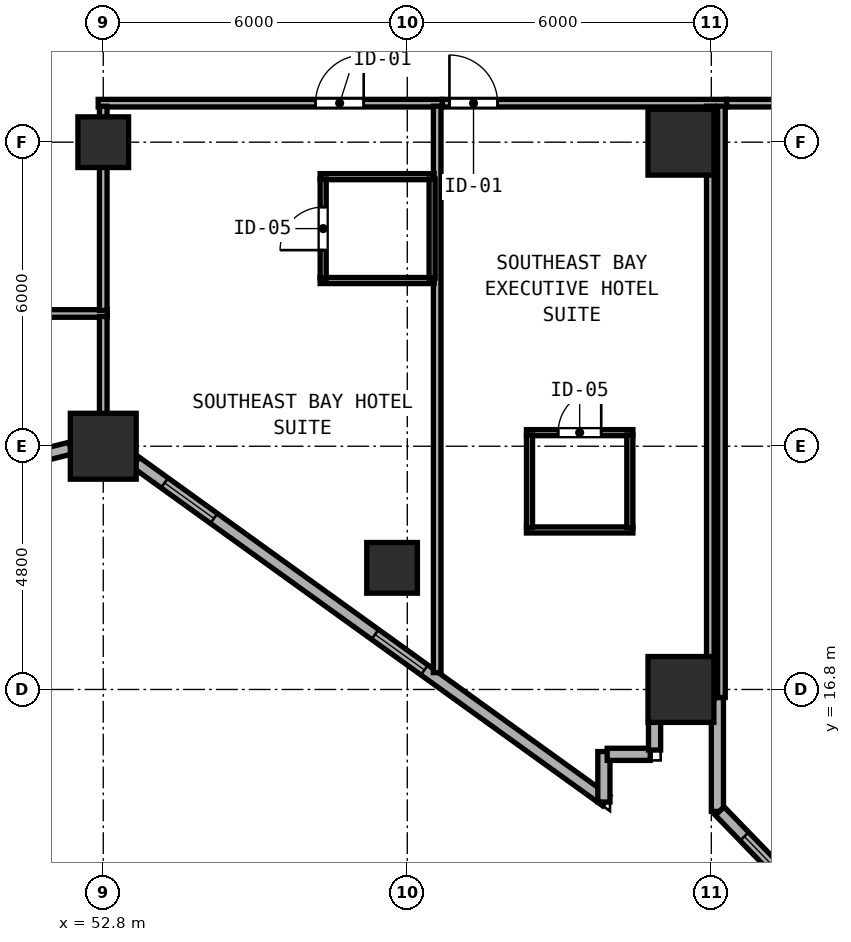
"""IFC4 building model, lengths in metres.
Left out: names, types, materials, properties, quantities, classifications, styles, units other than length and angle.
Written with IfcOpenShell. Run it as: python <this file> out.ifc"""

import sys

from ifc_helpers import new_model, si_unit, direction, frame, frame_2d, origin, origin_2d, place, context, subcontext, project, spatial, rectangle, hollow_rectangle, extrude, element, fill, save


model = new_model("IFC4")
c1 = context("Model", 3, precision=1e-05, world=origin(), true_north=direction((0.0, 1.0)))
c2 = subcontext(c1, "Body", "Model", "MODEL_VIEW")
j1 = project(units=[si_unit("LENGTHUNIT", "METRE"), si_unit("PLANEANGLEUNIT", "RADIAN")], contexts=[c1])
p1 = place(None, origin())
s1 = spatial("IfcSite", under=j1, at=p1, CompositionType="ELEMENT")
p2 = place(p1, origin())
s2 = spatial("IfcBuilding", under=s1, at=p2, CompositionType="ELEMENT")
p3 = place(p2, frame((0.0, 0.0, 35.4)))
s3 = spatial("IfcBuildingStorey", under=s2, at=p3, CompositionType="ELEMENT", Elevation=35.4)
for number, where, z_axis, x_axis in (
    (1, (52.8, 21.6, 0.0), (0.0, 0.0, 1.0), (1.0, 0.0, 0.0)),
    (2, (64.2, 16.8, 0.0), (0.0, 0.0, 1.0), (1.0, 0.0, 0.0)),
    (3, (64.2, 27.6, 0.0), (0.0, 0.0, 1.0), (1.0, 0.0, 0.0)),
):
    element("IfcColumn", number, at=place(p3, frame(where, z_axis=z_axis, x_axis=x_axis)), inside=s3, PredefinedType="COLUMN", context=c2, shape_type="SweptSolid", body=[
        extrude(hollow_rectangle(XDim=1.3, YDim=1.3, WallThickness=0.048, at=origin_2d()), origin(), (0.0, 0.0, 1.0), 3.8),
    ])
for number, where, z_axis, x_axis in (
    (4, (52.8, 27.6, 0.0), (0.0, 0.0, 1.0), (1.0, 0.0, 0.0)),
    (5, (58.5, 19.2, 0.0), (0.0, 0.0, 1.0), (1.0, 0.0, 0.0)),
):
    element("IfcColumn", number, at=place(p3, frame(where, z_axis=z_axis, x_axis=x_axis)), inside=s3, PredefinedType="COLUMN", context=c2, shape_type="SweptSolid", body=[
        extrude(hollow_rectangle(XDim=1.0, YDim=1.0, WallThickness=0.038, at=origin_2d()), origin(), (0.0, 0.0, 1.0), 3.8),
    ])
p4 = place(p3, frame((47.932, 20.507, 0.0), z_axis=(0.0, 0.0, 1.0), x_axis=(0.970135906278, 0.242561998982, 0.0)))
e6 = element("IfcWall", 6, at=p4, inside=s3, PredefinedType="SOLIDWALL", context=c2, shape_type="SweptSolid", body=[
    extrude(rectangle(XDim=4.356, YDim=0.24, at=frame_2d((2.178, 0.0))), origin(), (0.0, 0.0, 1.0), 3.097),
])
p5 = place(p4, frame((0.7, 0.0, 0.85)))
e7 = element("IfcOpeningElement", 7, at=p5, cuts=e6, PredefinedType="OPENING", context=c2, shape_type="SweptSolid", body=[
    extrude(rectangle(XDim=1.2, YDim=1.85, at=frame_2d((0.6, 0.925))), frame((0.0, 0.13, 0.0), z_axis=(0.0, -1.0, 0.0), x_axis=(1.0, 0.0, 0.0)), (0.0, 0.0, 1.0), 0.26),
])
p6 = place(p3, frame((53.442, 21.286, 0.0), z_axis=(0.0, 0.0, 1.0), x_axis=(0.811542842993, -0.584292917967, 0.0)))
e8 = element("IfcWall", 8, at=p6, inside=s3, PredefinedType="SOLIDWALL", context=c2, shape_type="SweptSolid", body=[
    extrude(rectangle(XDim=11.438, YDim=0.24, at=frame_2d((5.719, 0.0))), origin(), (0.0, 0.0, 1.0), 3.097),
])
p7 = place(p6, frame((0.7, 0.0, 0.85)))
e9 = element("IfcOpeningElement", 9, at=p7, cuts=e8, PredefinedType="OPENING", context=c2, shape_type="SweptSolid", body=[
    extrude(rectangle(XDim=1.2, YDim=1.85, at=frame_2d((0.6, 0.925))), frame((0.0, 0.13, 0.0), z_axis=(0.0, -1.0, 0.0), x_axis=(1.0, 0.0, 0.0)), (0.0, 0.0, 1.0), 0.26),
])
p8 = place(p6, frame((5.819, 0.0, 0.85)))
e10 = element("IfcOpeningElement", 10, at=p8, cuts=e8, PredefinedType="OPENING", context=c2, shape_type="SweptSolid", body=[
    extrude(rectangle(XDim=1.2, YDim=1.85, at=frame_2d((0.6, 0.925))), frame((0.0, 0.13, 0.0), z_axis=(0.0, -1.0, 0.0), x_axis=(1.0, 0.0, 0.0)), (0.0, 0.0, 1.0), 0.26),
])
p9 = place(p3, frame((62.68, 14.579, 0.0), z_axis=(0.0, 0.0, 1.0), x_axis=(0.0, 1.0, 0.0)))
e11 = element("IfcWall", 11, at=p9, inside=s3, PredefinedType="SOLIDWALL", context=c2, shape_type="SweptSolid", body=[
    extrude(rectangle(XDim=0.996, YDim=0.24, at=frame_2d((0.498, 0.0))), origin(), (0.0, 0.0, 1.0), 3.6),
])
p10 = place(p3, frame((62.745, 15.52, 0.0), z_axis=(0.0, 0.0, 1.0), x_axis=(1.0, 0.0, 0.0)))
e12 = element("IfcWall", 12, at=p10, inside=s3, PredefinedType="SOLIDWALL", context=c2, shape_type="SweptSolid", body=[
    extrude(rectangle(XDim=0.85, YDim=0.24, at=frame_2d((0.425, 0.0))), origin(), (0.0, 0.0, 1.0), 3.6),
])
p11 = place(p3, frame((63.68, 15.605, 0.0), z_axis=(0.0, 0.0, 1.0), x_axis=(0.0, 1.0, 0.0)))
e13 = element("IfcWall", 13, at=p11, inside=s3, PredefinedType="SOLIDWALL", context=c2, shape_type="SweptSolid", body=[
    extrude(rectangle(XDim=0.553, YDim=0.24, at=frame_2d((0.276, 0.0))), origin(), (0.0, 0.0, 1.0), 3.6),
])
p12 = place(p3, frame((64.92, 16.64, 0.0), z_axis=(0.0, 0.0, 1.0), x_axis=(0.0, -1.0, 0.0)))
e14 = element("IfcWall", 14, at=p12, inside=s3, PredefinedType="SOLIDWALL", context=c2, shape_type="SweptSolid", body=[
    extrude(rectangle(XDim=2.246, YDim=0.24, at=frame_2d((1.123, 0.0))), origin(), (0.0, 0.0, 1.0), 3.6),
])
p13 = place(p3, frame((64.965, 14.402, 0.0), z_axis=(0.0, 0.0, 1.0), x_axis=(0.695499332701, -0.718526741473, 0.0)))
e15 = element("IfcWall", 15, at=p13, inside=s3, PredefinedType="SOLIDWALL", context=c2, shape_type="SweptSolid", body=[
    extrude(rectangle(XDim=10.231, YDim=0.24, at=frame_2d((5.116, 0.0))), origin(), (0.0, 0.0, 1.0), 3.6),
])
p14 = place(p13, frame((0.7, 0.0, 0.85)))
e16 = element("IfcOpeningElement", 16, at=p14, cuts=e15, PredefinedType="OPENING", context=c2, shape_type="SweptSolid", body=[
    extrude(rectangle(XDim=1.2, YDim=1.85, at=frame_2d((0.6, 0.925))), frame((0.0, 0.13, 0.0), z_axis=(0.0, -1.0, 0.0), x_axis=(1.0, 0.0, 0.0)), (0.0, 0.0, 1.0), 0.26),
])
p15 = place(p13, frame((6.1, 0.0, 0.85)))
e17 = element("IfcOpeningElement", 17, at=p15, cuts=e15, PredefinedType="OPENING", context=c2, shape_type="SweptSolid", body=[
    extrude(rectangle(XDim=1.2, YDim=1.85, at=frame_2d((0.6, 0.925))), frame((0.0, 0.13, 0.0), z_axis=(0.0, -1.0, 0.0), x_axis=(1.0, 0.0, 0.0)), (0.0, 0.0, 1.0), 0.26),
])
p16 = place(p3, frame((45.682, 24.22, 0.0), z_axis=(0.0, 0.0, 1.0), x_axis=(1.0, 0.0, 0.0)))
e18 = element("IfcWall", 18, at=p16, inside=s3, PredefinedType="PARTITIONING", context=c2, shape_type="SweptSolid", body=[
    extrude(rectangle(XDim=7.198, YDim=0.15, at=frame_2d((3.599, 0.0))), origin(), (0.0, 0.0, 1.0), 3.6),
])
p17 = place(p16, frame((2.143, 0.0, 0.0), z_axis=(0.0, 0.0, 1.0), x_axis=(-1.0, 0.0, 0.0)))
e19 = element("IfcOpeningElement", 19, at=p17, cuts=e18, PredefinedType="OPENING", context=c2, shape_type="SweptSolid", body=[
    extrude(rectangle(XDim=0.95, YDim=2.12, at=frame_2d((0.475, 1.06))), frame((0.0, 0.085, 0.0), z_axis=(0.0, -1.0, 0.0), x_axis=(1.0, 0.0, 0.0)), (0.0, 0.0, 1.0), 0.17),
])
p18 = place(p3, frame((52.8, 21.819, 0.0), z_axis=(0.0, 0.0, 1.0), x_axis=(0.0, 1.0, 0.0)))
e20 = element("IfcWall", 20, at=p18, inside=s3, PredefinedType="PARTITIONING", context=c2, shape_type="SweptSolid", body=[
    extrude(rectangle(XDim=2.341, YDim=0.15, at=frame_2d((1.171, 0.0))), origin(), (0.0, 0.0, 1.0), 3.097),
])
p19 = place(p3, frame((52.7, 28.37, 0.0), z_axis=(0.0, 0.0, 1.0), x_axis=(1.0, 0.0, 0.0)))
e21 = element("IfcWall", 21, at=p19, inside=s3, PredefinedType="PARTITIONING", context=c2, shape_type="SweptSolid", body=[
    extrude(rectangle(XDim=6.79, YDim=0.15, at=frame_2d((3.395, 0.0))), origin(), (0.0, 0.0, 1.0), 3.6),
])
p20 = place(p19, frame((5.24, 0.0, 0.0), z_axis=(0.0, 0.0, 1.0), x_axis=(-1.0, 0.0, 0.0)))
e22 = element("IfcOpeningElement", 22, at=p20, cuts=e21, PredefinedType="OPENING", context=c2, shape_type="SweptSolid", body=[
    extrude(rectangle(XDim=0.95, YDim=2.18, at=frame_2d((0.475, 1.09))), frame((0.0, 0.085, 0.0), z_axis=(0.0, -1.0, 0.0), x_axis=(1.0, 0.0, 0.0)), (0.0, 0.0, 1.0), 0.17),
])
p21 = place(p3, frame((52.8, 24.28, 0.0), z_axis=(0.0, 0.0, 1.0), x_axis=(0.0, 1.0, 0.0)))
e23 = element("IfcWall", 23, at=p21, inside=s3, PredefinedType="PARTITIONING", context=c2, shape_type="SweptSolid", body=[
    extrude(rectangle(XDim=4.03, YDim=0.15, at=frame_2d((2.015, 0.0))), origin(), (0.0, 0.0, 1.0), 3.097),
])
p22 = place(p3, frame((59.39, 17.133, 0.0), z_axis=(0.0, 0.0, 1.0), x_axis=(0.0, 1.0, 0.0)))
e24 = element("IfcWall", 24, at=p22, inside=s3, PredefinedType="PARTITIONING", context=c2, shape_type="SweptSolid", body=[
    extrude(rectangle(XDim=11.177, YDim=0.15, at=frame_2d((5.589, 0.0))), origin(), (0.0, 0.0, 1.0), 3.6),
])
p23 = place(p3, frame((57.08, 26.92, 0.0), z_axis=(0.0, 0.0, 1.0), x_axis=(1.0, 0.0, 0.0)))
e25 = element("IfcWall", 25, at=p23, inside=s3, PredefinedType="PARTITIONING", context=c2, shape_type="SweptSolid", body=[
    extrude(rectangle(XDim=2.25, YDim=0.12, at=frame_2d((1.125, 0.0))), origin(), (0.0, 0.0, 1.0), 3.6),
])
p24 = place(p3, frame((57.08, 24.87, 0.0), z_axis=(0.0, 0.0, 1.0), x_axis=(1.0, 0.0, 0.0)))
e26 = element("IfcWall", 26, at=p24, inside=s3, PredefinedType="PARTITIONING", context=c2, shape_type="SweptSolid", body=[
    extrude(rectangle(XDim=2.25, YDim=0.12, at=frame_2d((1.125, 0.0))), origin(), (0.0, 0.0, 1.0), 3.185),
])
p25 = place(p3, frame((57.14, 24.915, 0.0), z_axis=(0.0, 0.0, 1.0), x_axis=(0.0, 1.0, 0.0)))
e27 = element("IfcWall", 27, at=p25, inside=s3, PredefinedType="PARTITIONING", context=c2, shape_type="SweptSolid", body=[
    extrude(rectangle(XDim=1.96, YDim=0.12, at=frame_2d((0.98, 0.0))), origin(), (0.0, 0.0, 1.0), 3.6),
])
p26 = place(p25, frame((1.405, 0.0, 0.0), z_axis=(0.0, 0.0, 1.0), x_axis=(-1.0, 0.0, 0.0)))
e28 = element("IfcOpeningElement", 28, at=p26, cuts=e27, PredefinedType="OPENING", context=c2, shape_type="SweptSolid", body=[
    extrude(rectangle(XDim=0.85, YDim=2.1, at=frame_2d((0.425, 1.05))), frame((0.0, 0.07, 0.0), z_axis=(0.0, -1.0, 0.0), x_axis=(1.0, 0.0, 0.0)), (0.0, 0.0, 1.0), 0.14),
])
p27 = place(p3, frame((59.29, 24.915, 0.0), z_axis=(0.0, 0.0, 1.0), x_axis=(0.0, 1.0, 0.0)))
e29 = element("IfcWall", 29, at=p27, inside=s3, PredefinedType="PARTITIONING", context=c2, shape_type="SweptSolid", body=[
    extrude(rectangle(XDim=1.96, YDim=0.12, at=frame_2d((0.98, 0.0))), origin(), (0.0, 0.0, 1.0), 3.6),
])
p28 = place(p3, frame((59.492, 28.37, 0.0), z_axis=(0.0, 0.0, 1.0), x_axis=(1.0, 0.0, 0.0)))
e30 = element("IfcWall", 30, at=p28, inside=s3, PredefinedType="PARTITIONING", context=c2, shape_type="SweptSolid", body=[
    extrude(rectangle(XDim=5.608, YDim=0.15, at=frame_2d((2.804, 0.0))), origin(), (0.0, 0.0, 1.0), 3.6),
])
p29 = place(p28, frame((1.09, 0.0, 0.0), z_axis=(0.0, 0.0, 1.0), x_axis=(-1.0, 0.0, 0.0)))
e31 = element("IfcOpeningElement", 31, at=p29, cuts=e30, PredefinedType="OPENING", context=c2, shape_type="SweptSolid", body=[
    extrude(rectangle(XDim=0.95, YDim=2.18, at=frame_2d((0.475, 1.09))), frame((0.0, 0.085, 0.0), z_axis=(0.0, -1.0, 0.0), x_axis=(1.0, 0.0, 0.0)), (0.0, 0.0, 1.0), 0.17),
])
p30 = place(p3, frame((65.0, 16.642, 0.0), z_axis=(0.0, 0.0, 1.0), x_axis=(0.0, 1.0, 0.0)))
e32 = element("IfcWall", 32, at=p30, inside=s3, PredefinedType="PARTITIONING", context=c2, shape_type="SweptSolid", body=[
    extrude(rectangle(XDim=11.668, YDim=0.15, at=frame_2d((5.834, 0.0))), origin(), (0.0, 0.0, 1.0), 3.6),
])
p31 = place(p3, frame((61.152, 21.868, 0.0), z_axis=(0.0, 0.0, 1.0), x_axis=(1.0, 0.0, 0.0)))
e33 = element("IfcWall", 33, at=p31, inside=s3, PredefinedType="PARTITIONING", context=c2, shape_type="SweptSolid", body=[
    extrude(rectangle(XDim=2.1, YDim=0.12, at=frame_2d((1.05, 0.0))), origin(), (0.0, 0.0, 1.0), 3.6),
])
p32 = place(p31, frame((1.475, 0.0, 0.0), z_axis=(0.0, 0.0, 1.0), x_axis=(-1.0, 0.0, 0.0)))
e34 = element("IfcOpeningElement", 34, at=p32, cuts=e33, PredefinedType="OPENING", context=c2, shape_type="SweptSolid", body=[
    extrude(rectangle(XDim=0.85, YDim=2.1, at=frame_2d((0.425, 1.05))), frame((0.0, 0.07, 0.0), z_axis=(0.0, -1.0, 0.0), x_axis=(1.0, 0.0, 0.0)), (0.0, 0.0, 1.0), 0.14),
])
p33 = place(p3, frame((61.152, 19.948, 0.0), z_axis=(0.0, 0.0, 1.0), x_axis=(1.0, 0.0, 0.0)))
e35 = element("IfcWall", 35, at=p33, inside=s3, PredefinedType="PARTITIONING", context=c2, shape_type="SweptSolid", body=[
    extrude(rectangle(XDim=2.1, YDim=0.12, at=frame_2d((1.05, 0.0))), origin(), (0.0, 0.0, 1.0), 3.6),
])
for number, where, z_axis, x_axis in (
    (36, (61.212, 19.993, 0.0), (0.0, 0.0, 1.0), (0.0, 1.0, 0.0)),
    (37, (63.192, 19.993, 0.0), (0.0, 0.0, 1.0), (0.0, 1.0, 0.0)),
):
    element("IfcWall", number, at=place(p3, frame(where, z_axis=z_axis, x_axis=x_axis)), inside=s3, PredefinedType="PARTITIONING", context=c2, shape_type="SweptSolid", body=[
        extrude(rectangle(XDim=1.83, YDim=0.12, at=frame_2d((0.915, 0.0))), origin(), (0.0, 0.0, 1.0), 3.6),
    ])
p34 = place(p3, frame((65.102, 28.37, 0.0), z_axis=(0.0, 0.0, 1.0), x_axis=(1.0, 0.0, 0.0)))
e38 = element("IfcWall", 38, at=p34, inside=s3, PredefinedType="PARTITIONING", context=c2, shape_type="SweptSolid", body=[
    extrude(rectangle(XDim=8.733, YDim=0.15, at=frame_2d((4.366, 0.0))), origin(), (0.0, 0.0, 1.0), 3.6),
])
p35 = place(p34, frame((4.523, 0.0, 0.0), z_axis=(0.0, 0.0, 1.0), x_axis=(-1.0, 0.0, 0.0)))
e39 = element("IfcOpeningElement", 39, at=p35, cuts=e38, PredefinedType="OPENING", context=c2, shape_type="SweptSolid", body=[
    extrude(rectangle(XDim=0.95, YDim=2.18, at=frame_2d((0.475, 1.09))), frame((0.0, 0.085, 0.0), z_axis=(0.0, -1.0, 0.0), x_axis=(1.0, 0.0, 0.0)), (0.0, 0.0, 1.0), 0.17),
])
p36 = place(p3, frame((64.78, 16.612, 0.0), z_axis=(0.0, 0.0, 1.0), x_axis=(0.0, 1.0, 0.0)))
e40 = element("IfcWall", 40, at=p36, inside=s3, PredefinedType="PARTITIONING", context=c2, shape_type="SweptSolid", body=[
    extrude(rectangle(XDim=11.698, YDim=0.15, at=frame_2d((5.849, 0.0))), origin(), (0.0, 0.0, 1.0), 3.6),
])
p37 = place(p7, origin())
e41 = element("IfcWindow", 41, at=p37, inside=s3, PartitioningType="SINGLE_PANEL", PredefinedType="WINDOW", context=c2, shape_type="SweptSolid", body=[
    extrude(rectangle(XDim=1.2, YDim=1.85, at=frame_2d((0.6, 0.925))), frame((0.0, 0.03, 0.0), z_axis=(0.0, -1.0, 0.0), x_axis=(1.0, 0.0, 0.0)), (0.0, 0.0, 1.0), 0.06),
])
fill(e9, e41)
p38 = place(p8, origin())
e42 = element("IfcWindow", 42, at=p38, inside=s3, PartitioningType="SINGLE_PANEL", PredefinedType="WINDOW", context=c2, shape_type="SweptSolid", body=[
    extrude(rectangle(XDim=1.2, YDim=1.85, at=frame_2d((0.6, 0.925))), frame((0.0, 0.03, 0.0), z_axis=(0.0, -1.0, 0.0), x_axis=(1.0, 0.0, 0.0)), (0.0, 0.0, 1.0), 0.06),
])
fill(e10, e42)
p39 = place(p14, origin())
e43 = element("IfcWindow", 43, at=p39, inside=s3, PartitioningType="SINGLE_PANEL", PredefinedType="WINDOW", context=c2, shape_type="SweptSolid", body=[
    extrude(rectangle(XDim=1.2, YDim=1.85, at=frame_2d((0.6, 0.925))), frame((0.0, 0.03, 0.0), z_axis=(0.0, -1.0, 0.0), x_axis=(1.0, 0.0, 0.0)), (0.0, 0.0, 1.0), 0.06),
])
fill(e16, e43)
p40 = place(p20, origin())
e44 = element("IfcDoor", 44, at=p40, inside=s3, OperationType="SINGLE_SWING_LEFT", PredefinedType="DOOR", context=c2, shape_type="SweptSolid", body=[
    extrude(rectangle(XDim=0.95, YDim=2.18, at=frame_2d((0.475, 1.09))), frame((0.0, 0.025, 0.0), z_axis=(0.0, -1.0, 0.0), x_axis=(1.0, 0.0, 0.0)), (0.0, 0.0, 1.0), 0.05),
])
fill(e22, e44)
p41 = place(p26, origin())
e45 = element("IfcDoor", 45, at=p41, inside=s3, OperationType="SINGLE_SWING_RIGHT", PredefinedType="DOOR", context=c2, shape_type="SweptSolid", body=[
    extrude(rectangle(XDim=0.85, YDim=2.1, at=frame_2d((0.425, 1.05))), frame((0.0, 0.025, 0.0), z_axis=(0.0, -1.0, 0.0), x_axis=(1.0, 0.0, 0.0)), (0.0, 0.0, 1.0), 0.05),
])
fill(e28, e45)
p42 = place(p29, origin())
e46 = element("IfcDoor", 46, at=p42, inside=s3, OperationType="SINGLE_SWING_RIGHT", PredefinedType="DOOR", context=c2, shape_type="SweptSolid", body=[
    extrude(rectangle(XDim=0.95, YDim=2.18, at=frame_2d((0.475, 1.09))), frame((0.0, 0.025, 0.0), z_axis=(0.0, -1.0, 0.0), x_axis=(1.0, 0.0, 0.0)), (0.0, 0.0, 1.0), 0.05),
])
fill(e31, e46)
p43 = place(p32, origin())
e47 = element("IfcDoor", 47, at=p43, inside=s3, OperationType="SINGLE_SWING_LEFT", PredefinedType="DOOR", context=c2, shape_type="SweptSolid", body=[
    extrude(rectangle(XDim=0.85, YDim=2.1, at=frame_2d((0.425, 1.05))), frame((0.0, 0.025, 0.0), z_axis=(0.0, -1.0, 0.0), x_axis=(1.0, 0.0, 0.0)), (0.0, 0.0, 1.0), 0.05),
])
fill(e34, e47)
save(model, sys.argv[1])
